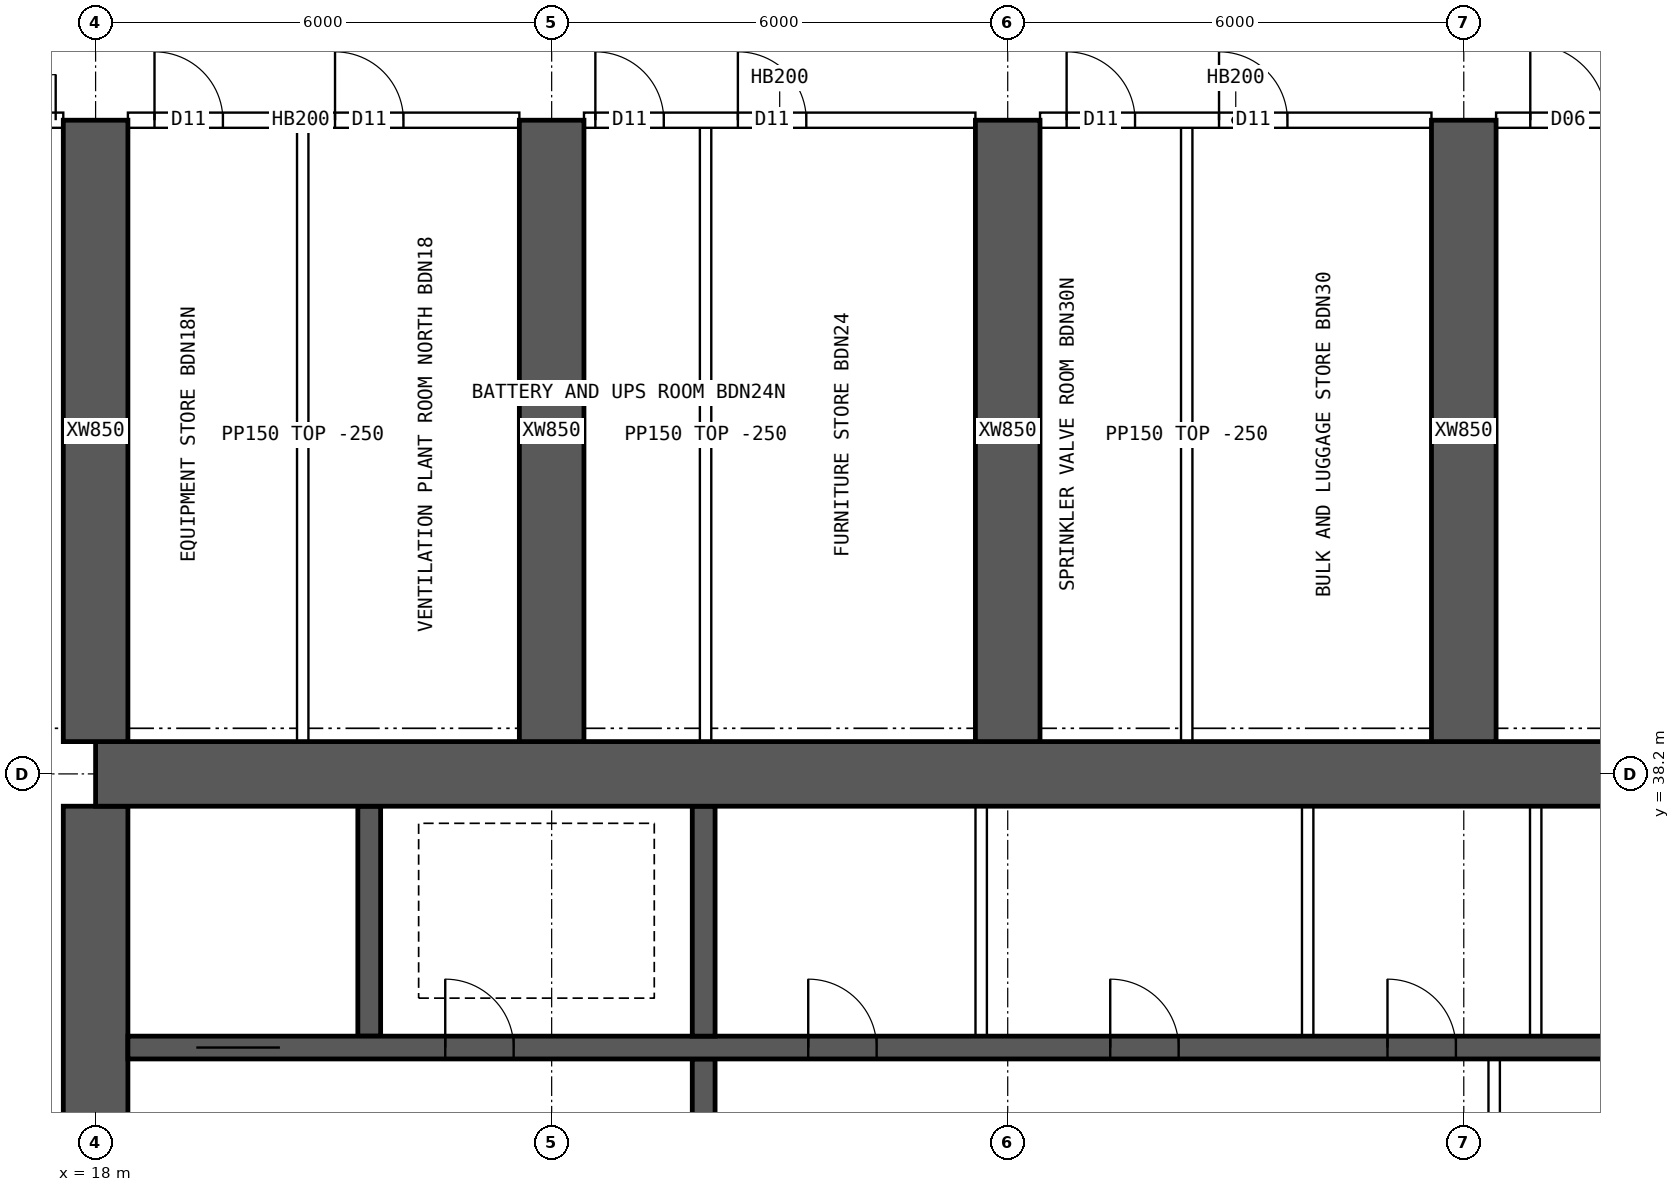
"""IFC4 building model, lengths in metres.
Left out: names, types, materials, properties, quantities, classifications, styles, units other than length and angle.
Written with IfcOpenShell. Run it as: python <this file> out.ifc"""

import sys

from ifc_helpers import new_model, si_unit, direction, frame, frame_2d, origin, place, context, subcontext, project, spatial, rectangle, extrude, element, fill, save


model = new_model("IFC4")
c1 = context("Model", 3, precision=1e-05, world=origin(), true_north=direction((0.0, 1.0)))
c2 = subcontext(c1, "Body", "Model", "MODEL_VIEW")
j1 = project(units=[si_unit("LENGTHUNIT", "METRE"), si_unit("PLANEANGLEUNIT", "RADIAN")], contexts=[c1])
p1 = place(None, origin())
s1 = spatial("IfcSite", under=j1, at=p1, CompositionType="ELEMENT")
p2 = place(p1, origin())
s2 = spatial("IfcBuilding", under=s1, at=p2, CompositionType="ELEMENT")
p3 = place(p2, frame((0.0, 0.0, 163.6)))
s3 = spatial("IfcBuildingStorey", under=s2, at=p3, CompositionType="ELEMENT", Elevation=163.6)
p4 = place(p3, frame((18.0, 38.2, 0.0), z_axis=(0.0, 0.0, 1.0), x_axis=(1.0, 0.0, 0.0)))
e1 = element("IfcWall", 1, at=p4, inside=s3, PredefinedType="SHEAR", context=c2, shape_type="SweptSolid", body=[
    extrude(rectangle(XDim=48.0, YDim=0.85, at=frame_2d((24.0, 0.0))), origin(), (0.0, 0.0, 1.0), 3.75),
])
p5 = place(p3, frame((18.0, 26.225, 0.0), z_axis=(0.0, 0.0, 1.0), x_axis=(0.0, 1.0, 0.0)))
e2 = element("IfcWall", 2, at=p5, inside=s3, PredefinedType="SHEAR", context=c2, shape_type="SweptSolid", body=[
    extrude(rectangle(XDim=11.55, YDim=0.85, at=frame_2d((5.775, 0.0))), origin(), (0.0, 0.0, 1.0), 3.75),
])
p6 = place(p5, frame((5.075, 0.0, 0.0)))
e3 = element("IfcOpeningElement", 3, at=p6, cuts=e2, PredefinedType="OPENING", context=c2, shape_type="SweptSolid", body=[
    extrude(rectangle(XDim=1.2, YDim=2.1, at=frame_2d((0.6, 1.05))), frame((0.0, 0.435, 0.0), z_axis=(0.0, -1.0, 0.0), x_axis=(1.0, 0.0, 0.0)), (0.0, 0.0, 1.0), 0.87),
])
p7 = place(p3, frame((18.425, 34.6, 0.0), z_axis=(0.0, 0.0, 1.0), x_axis=(1.0, 0.0, 0.0)))
e4 = element("IfcWall", 4, at=p7, inside=s3, PredefinedType="SHEAR", context=c2, shape_type="SweptSolid", body=[
    extrude(rectangle(XDim=47.15, YDim=0.3, at=frame_2d((23.575, 0.0))), origin(), (0.0, 0.0, 1.0), 3.75),
])
p8 = place(p7, frame((0.9, 0.0, 0.0)))
e5 = element("IfcOpeningElement", 5, at=p8, cuts=e4, PredefinedType="OPENING", context=c2, shape_type="SweptSolid", body=[
    extrude(rectangle(XDim=1.1, YDim=2.1, at=frame_2d((0.55, 1.05))), frame((0.0, 0.16, 0.0), z_axis=(0.0, -1.0, 0.0), x_axis=(1.0, 0.0, 0.0)), (0.0, 0.0, 1.0), 0.32),
])
p9 = place(p7, frame((45.15, 0.0, 0.0)))
e6 = element("IfcOpeningElement", 6, at=p9, cuts=e4, PredefinedType="OPENING", context=c2, shape_type="SweptSolid", body=[
    extrude(rectangle(XDim=1.1, YDim=2.1, at=frame_2d((0.55, 1.05))), frame((0.0, 0.16, 0.0), z_axis=(0.0, -1.0, 0.0), x_axis=(1.0, 0.0, 0.0)), (0.0, 0.0, 1.0), 0.32),
])
p10 = place(p7, frame((4.175, 0.0, 0.0)))
e7 = element("IfcOpeningElement", 7, at=p10, cuts=e4, PredefinedType="OPENING", context=c2, shape_type="SweptSolid", body=[
    extrude(rectangle(XDim=0.9, YDim=2.1, at=frame_2d((0.45, 1.05))), frame((0.0, 0.16, 0.0), z_axis=(0.0, -1.0, 0.0), x_axis=(1.0, 0.0, 0.0)), (0.0, 0.0, 1.0), 0.32),
])
p11 = place(p7, frame((42.075, 0.0, 0.0)))
e8 = element("IfcOpeningElement", 8, at=p11, cuts=e4, PredefinedType="OPENING", context=c2, shape_type="SweptSolid", body=[
    extrude(rectangle(XDim=0.9, YDim=2.1, at=frame_2d((0.45, 1.05))), frame((0.0, 0.16, 0.0), z_axis=(0.0, -1.0, 0.0), x_axis=(1.0, 0.0, 0.0)), (0.0, 0.0, 1.0), 0.32),
])
p12 = place(p7, frame((8.95, 0.0, 0.0)))
e9 = element("IfcOpeningElement", 9, at=p12, cuts=e4, PredefinedType="OPENING", context=c2, shape_type="SweptSolid", body=[
    extrude(rectangle(XDim=0.9, YDim=2.1, at=frame_2d((0.45, 1.05))), frame((0.0, 0.16, 0.0), z_axis=(0.0, -1.0, 0.0), x_axis=(1.0, 0.0, 0.0)), (0.0, 0.0, 1.0), 0.32),
])
p13 = place(p7, frame((12.924, 0.0, 0.0)))
e10 = element("IfcOpeningElement", 10, at=p13, cuts=e4, PredefinedType="OPENING", context=c2, shape_type="SweptSolid", body=[
    extrude(rectangle(XDim=0.9, YDim=2.1, at=frame_2d((0.45, 1.05))), frame((0.0, 0.16, 0.0), z_axis=(0.0, -1.0, 0.0), x_axis=(1.0, 0.0, 0.0)), (0.0, 0.0, 1.0), 0.32),
])
p14 = place(p7, frame((16.571, 0.0, 0.0)))
e11 = element("IfcOpeningElement", 11, at=p14, cuts=e4, PredefinedType="OPENING", context=c2, shape_type="SweptSolid", body=[
    extrude(rectangle(XDim=0.9, YDim=2.1, at=frame_2d((0.45, 1.05))), frame((0.0, 0.16, 0.0), z_axis=(0.0, -1.0, 0.0), x_axis=(1.0, 0.0, 0.0)), (0.0, 0.0, 1.0), 0.32),
])
p15 = place(p7, frame((20.33, 0.0, 0.0)))
e12 = element("IfcOpeningElement", 12, at=p15, cuts=e4, PredefinedType="OPENING", context=c2, shape_type="SweptSolid", body=[
    extrude(rectangle(XDim=0.9, YDim=2.1, at=frame_2d((0.45, 1.05))), frame((0.0, 0.16, 0.0), z_axis=(0.0, -1.0, 0.0), x_axis=(1.0, 0.0, 0.0)), (0.0, 0.0, 1.0), 0.32),
])
p16 = place(p7, frame((24.736, 0.0, 0.0)))
e13 = element("IfcOpeningElement", 13, at=p16, cuts=e4, PredefinedType="OPENING", context=c2, shape_type="SweptSolid", body=[
    extrude(rectangle(XDim=0.9, YDim=2.1, at=frame_2d((0.45, 1.05))), frame((0.0, 0.16, 0.0), z_axis=(0.0, -1.0, 0.0), x_axis=(1.0, 0.0, 0.0)), (0.0, 0.0, 1.0), 0.32),
])
p17 = place(p7, frame((27.533, 0.0, 0.0)))
e14 = element("IfcOpeningElement", 14, at=p17, cuts=e4, PredefinedType="OPENING", context=c2, shape_type="SweptSolid", body=[
    extrude(rectangle(XDim=0.9, YDim=2.1, at=frame_2d((0.45, 1.05))), frame((0.0, 0.16, 0.0), z_axis=(0.0, -1.0, 0.0), x_axis=(1.0, 0.0, 0.0)), (0.0, 0.0, 1.0), 0.32),
])
p18 = place(p7, frame((29.906, 0.0, 0.0)))
e15 = element("IfcOpeningElement", 15, at=p18, cuts=e4, PredefinedType="OPENING", context=c2, shape_type="SweptSolid", body=[
    extrude(rectangle(XDim=0.9, YDim=2.1, at=frame_2d((0.45, 1.05))), frame((0.0, 0.16, 0.0), z_axis=(0.0, -1.0, 0.0), x_axis=(1.0, 0.0, 0.0)), (0.0, 0.0, 1.0), 0.32),
])
p19 = place(p7, frame((33.756, 0.0, 0.0)))
e16 = element("IfcOpeningElement", 16, at=p19, cuts=e4, PredefinedType="OPENING", context=c2, shape_type="SweptSolid", body=[
    extrude(rectangle(XDim=0.9, YDim=2.1, at=frame_2d((0.45, 1.05))), frame((0.0, 0.16, 0.0), z_axis=(0.0, -1.0, 0.0), x_axis=(1.0, 0.0, 0.0)), (0.0, 0.0, 1.0), 0.32),
])
p20 = place(p7, frame((37.504, 0.0, 0.0)))
e17 = element("IfcOpeningElement", 17, at=p20, cuts=e4, PredefinedType="OPENING", context=c2, shape_type="SweptSolid", body=[
    extrude(rectangle(XDim=0.9, YDim=2.1, at=frame_2d((0.45, 1.05))), frame((0.0, 0.16, 0.0), z_axis=(0.0, -1.0, 0.0), x_axis=(1.0, 0.0, 0.0)), (0.0, 0.0, 1.0), 0.32),
])
p21 = place(p3, frame((26.0, 30.55, 0.0), z_axis=(0.0, 0.0, 1.0), x_axis=(0.0, 1.0, 0.0)))
e18 = element("IfcWall", 18, at=p21, inside=s3, PredefinedType="SHEAR", context=c2, shape_type="SweptSolid", body=[
    extrude(rectangle(XDim=3.9, YDim=0.3, at=frame_2d((1.95, 0.0))), origin(), (0.0, 0.0, 1.0), 3.75),
])
p22 = place(p21, frame((1.4, 0.0, 0.0)))
e19 = element("IfcOpeningElement", 19, at=p22, cuts=e18, PredefinedType="OPENING", context=c2, shape_type="SweptSolid", body=[
    extrude(rectangle(XDim=1.2, YDim=2.1, at=frame_2d((0.6, 1.05))), frame((0.0, 0.16, 0.0), z_axis=(0.0, -1.0, 0.0), x_axis=(1.0, 0.0, 0.0)), (0.0, 0.0, 1.0), 0.32),
])
for number, where, z_axis, x_axis in (
    (20, (21.6, 34.75, 0.0), (0.0, 0.0, 1.0), (0.0, 1.0, 0.0)),
    (21, (26.0, 34.75, 0.0), (0.0, 0.0, 1.0), (0.0, 1.0, 0.0)),
):
    element("IfcWall", number, at=place(p3, frame(where, z_axis=z_axis, x_axis=x_axis)), inside=s3, PredefinedType="SHEAR", context=c2, shape_type="SweptSolid", body=[
        extrude(rectangle(XDim=3.025, YDim=0.3, at=frame_2d((1.512, 0.0))), origin(), (0.0, 0.0, 1.0), 3.75),
    ])
for number, where, z_axis, x_axis in (
    (22, (18.0, 38.625, 0.0), (0.0, 0.0, 1.0), (0.0, 1.0, 0.0)),
    (23, (24.0, 38.625, 0.0), (0.0, 0.0, 1.0), (0.0, 1.0, 0.0)),
    (24, (30.0, 38.625, 0.0), (0.0, 0.0, 1.0), (0.0, 1.0, 0.0)),
    (25, (36.0, 38.625, 0.0), (0.0, 0.0, 1.0), (0.0, 1.0, 0.0)),
):
    element("IfcWall", number, at=place(p3, frame(where, z_axis=z_axis, x_axis=x_axis)), inside=s3, PredefinedType="SHEAR", context=c2, shape_type="SweptSolid", body=[
        extrude(rectangle(XDim=8.175, YDim=0.85, at=frame_2d((4.087, 0.0))), origin(), (0.0, 0.0, 1.0), 3.75),
    ])
p23 = place(p3, frame((36.4, 30.55, 0.0), z_axis=(0.0, 0.0, 1.0), x_axis=(0.0, 1.0, 0.0)))
e26 = element("IfcWall", 26, at=p23, inside=s3, PredefinedType="SOLIDWALL", context=c2, shape_type="SweptSolid", body=[
    extrude(rectangle(XDim=3.9, YDim=0.15, at=frame_2d((1.95, 0.0))), origin(), (0.0, 0.0, 1.0), 3.5),
])
p24 = place(p23, frame((1.15, 0.0, 0.0)))
e27 = element("IfcOpeningElement", 27, at=p24, cuts=e26, PredefinedType="OPENING", context=c2, shape_type="SweptSolid", body=[
    extrude(rectangle(XDim=1.6, YDim=2.1, at=frame_2d((0.8, 1.05))), frame((0.0, 0.085, 0.0), z_axis=(0.0, -1.0, 0.0), x_axis=(1.0, 0.0, 0.0)), (0.0, 0.0, 1.0), 0.17),
])
for number, where, z_axis, x_axis in (
    (28, (29.651, 34.75, 0.0), (0.0, 0.0, 1.0), (0.0, 1.0, 0.0)),
    (29, (33.946, 34.75, 0.0), (0.0, 0.0, 1.0), (0.0, 1.0, 0.0)),
    (30, (36.946, 34.75, 0.0), (0.0, 0.0, 1.0), (0.0, 1.0, 0.0)),
):
    element("IfcWall", number, at=place(p3, frame(where, z_axis=z_axis, x_axis=x_axis)), inside=s3, PredefinedType="SOLIDWALL", context=c2, shape_type="SweptSolid", body=[
        extrude(rectangle(XDim=3.025, YDim=0.15, at=frame_2d((1.512, 0.0))), origin(), (0.0, 0.0, 1.0), 3.5),
    ])
p25 = place(p3, frame((15.6, 46.8, 0.0), z_axis=(0.0, 0.0, 1.0), x_axis=(1.0, 0.0, 0.0)))
e31 = element("IfcWall", 31, at=p25, inside=s3, PredefinedType="SOLIDWALL", context=c2, shape_type="SweptSolid", body=[
    extrude(rectangle(XDim=1.975, YDim=0.2, at=frame_2d((0.987, 0.0))), origin(), (0.0, 0.0, 1.0), 3.5),
])
p26 = place(p25, frame((0.675, 0.0, 0.0)))
e32 = element("IfcOpeningElement", 32, at=p26, cuts=e31, PredefinedType="OPENING", context=c2, shape_type="SweptSolid", body=[
    extrude(rectangle(XDim=1.2, YDim=2.1, at=frame_2d((0.6, 1.05))), frame((0.0, 0.11, 0.0), z_axis=(0.0, -1.0, 0.0), x_axis=(1.0, 0.0, 0.0)), (0.0, 0.0, 1.0), 0.22),
])
p27 = place(p3, frame((18.425, 46.8, 0.0), z_axis=(0.0, 0.0, 1.0), x_axis=(1.0, 0.0, 0.0)))
e33 = element("IfcWall", 33, at=p27, inside=s3, PredefinedType="SOLIDWALL", context=c2, shape_type="SweptSolid", body=[
    extrude(rectangle(XDim=5.15, YDim=0.2, at=frame_2d((2.575, 0.0))), origin(), (0.0, 0.0, 1.0), 3.5),
])
p28 = place(p27, frame((0.35, 0.0, 0.0)))
e34 = element("IfcOpeningElement", 34, at=p28, cuts=e33, PredefinedType="OPENING", context=c2, shape_type="SweptSolid", body=[
    extrude(rectangle(XDim=0.9, YDim=2.1, at=frame_2d((0.45, 1.05))), frame((0.0, 0.11, 0.0), z_axis=(0.0, -1.0, 0.0), x_axis=(1.0, 0.0, 0.0)), (0.0, 0.0, 1.0), 0.22),
])
p29 = place(p27, frame((2.725, 0.0, 0.0)))
e35 = element("IfcOpeningElement", 35, at=p29, cuts=e33, PredefinedType="OPENING", context=c2, shape_type="SweptSolid", body=[
    extrude(rectangle(XDim=0.9, YDim=2.1, at=frame_2d((0.45, 1.05))), frame((0.0, 0.11, 0.0), z_axis=(0.0, -1.0, 0.0), x_axis=(1.0, 0.0, 0.0)), (0.0, 0.0, 1.0), 0.22),
])
p30 = place(p3, frame((24.425, 46.8, 0.0), z_axis=(0.0, 0.0, 1.0), x_axis=(1.0, 0.0, 0.0)))
e36 = element("IfcWall", 36, at=p30, inside=s3, PredefinedType="SOLIDWALL", context=c2, shape_type="SweptSolid", body=[
    extrude(rectangle(XDim=5.15, YDim=0.2, at=frame_2d((2.575, 0.0))), origin(), (0.0, 0.0, 1.0), 3.5),
])
p31 = place(p30, frame((0.15, 0.0, 0.0)))
e37 = element("IfcOpeningElement", 37, at=p31, cuts=e36, PredefinedType="OPENING", context=c2, shape_type="SweptSolid", body=[
    extrude(rectangle(XDim=0.9, YDim=2.1, at=frame_2d((0.45, 1.05))), frame((0.0, 0.11, 0.0), z_axis=(0.0, -1.0, 0.0), x_axis=(1.0, 0.0, 0.0)), (0.0, 0.0, 1.0), 0.22),
])
p32 = place(p30, frame((2.025, 0.0, 0.0)))
e38 = element("IfcOpeningElement", 38, at=p32, cuts=e36, PredefinedType="OPENING", context=c2, shape_type="SweptSolid", body=[
    extrude(rectangle(XDim=0.9, YDim=2.1, at=frame_2d((0.45, 1.05))), frame((0.0, 0.11, 0.0), z_axis=(0.0, -1.0, 0.0), x_axis=(1.0, 0.0, 0.0)), (0.0, 0.0, 1.0), 0.22),
])
p33 = place(p3, frame((30.425, 46.8, 0.0), z_axis=(0.0, 0.0, 1.0), x_axis=(1.0, 0.0, 0.0)))
e39 = element("IfcWall", 39, at=p33, inside=s3, PredefinedType="SOLIDWALL", context=c2, shape_type="SweptSolid", body=[
    extrude(rectangle(XDim=5.15, YDim=0.2, at=frame_2d((2.575, 0.0))), origin(), (0.0, 0.0, 1.0), 3.5),
])
p34 = place(p33, frame((0.35, 0.0, 0.0)))
e40 = element("IfcOpeningElement", 40, at=p34, cuts=e39, PredefinedType="OPENING", context=c2, shape_type="SweptSolid", body=[
    extrude(rectangle(XDim=0.9, YDim=2.1, at=frame_2d((0.45, 1.05))), frame((0.0, 0.11, 0.0), z_axis=(0.0, -1.0, 0.0), x_axis=(1.0, 0.0, 0.0)), (0.0, 0.0, 1.0), 0.22),
])
p35 = place(p33, frame((2.355, 0.0, 0.0)))
e41 = element("IfcOpeningElement", 41, at=p35, cuts=e39, PredefinedType="OPENING", context=c2, shape_type="SweptSolid", body=[
    extrude(rectangle(XDim=0.9, YDim=2.1, at=frame_2d((0.45, 1.05))), frame((0.0, 0.11, 0.0), z_axis=(0.0, -1.0, 0.0), x_axis=(1.0, 0.0, 0.0)), (0.0, 0.0, 1.0), 0.22),
])
p36 = place(p3, frame((36.425, 46.8, 0.0), z_axis=(0.0, 0.0, 1.0), x_axis=(1.0, 0.0, 0.0)))
e42 = element("IfcWall", 42, at=p36, inside=s3, PredefinedType="SOLIDWALL", context=c2, shape_type="SweptSolid", body=[
    extrude(rectangle(XDim=5.15, YDim=0.2, at=frame_2d((2.575, 0.0))), origin(), (0.0, 0.0, 1.0), 3.5),
])
p37 = place(p36, frame((0.45, 0.0, 0.0)))
e43 = element("IfcOpeningElement", 43, at=p37, cuts=e42, PredefinedType="OPENING", context=c2, shape_type="SweptSolid", body=[
    extrude(rectangle(XDim=1.0, YDim=2.1, at=frame_2d((0.5, 1.05))), frame((0.0, 0.11, 0.0), z_axis=(0.0, -1.0, 0.0), x_axis=(1.0, 0.0, 0.0)), (0.0, 0.0, 1.0), 0.22),
])
for number, where, z_axis, x_axis in (
    (44, (20.725, 38.625, 0.0), (0.0, 0.0, 1.0), (0.0, 1.0, 0.0)),
    (45, (26.025, 38.625, 0.0), (0.0, 0.0, 1.0), (0.0, 1.0, 0.0)),
    (46, (32.355, 38.625, 0.0), (0.0, 0.0, 1.0), (0.0, 1.0, 0.0)),
):
    element("IfcWall", number, at=place(p3, frame(where, z_axis=z_axis, x_axis=x_axis)), inside=s3, PredefinedType="PARTITIONING", context=c2, shape_type="SweptSolid", body=[
        extrude(rectangle(XDim=8.075, YDim=0.15, at=frame_2d((4.038, 0.0))), origin(), (0.0, 0.0, 1.0), 3.5),
    ])
p38 = place(p8, origin())
e47 = element("IfcDoor", 47, at=p38, inside=s3, OperationType="DOUBLE_DOOR_SLIDING", PredefinedType="DOOR", context=c2, shape_type="SweptSolid", body=[
    extrude(rectangle(XDim=1.1, YDim=2.1, at=frame_2d((0.55, 1.05))), frame((0.0, 0.025, 0.0), z_axis=(0.0, -1.0, 0.0), x_axis=(1.0, 0.0, 0.0)), (0.0, 0.0, 1.0), 0.05),
])
fill(e5, e47)
p39 = place(p10, origin())
e48 = element("IfcDoor", 48, at=p39, inside=s3, OperationType="SINGLE_SWING_LEFT", PredefinedType="DOOR", context=c2, shape_type="SweptSolid", body=[
    extrude(rectangle(XDim=0.9, YDim=2.1, at=frame_2d((0.45, 1.05))), frame((0.0, 0.025, 0.0), z_axis=(0.0, -1.0, 0.0), x_axis=(1.0, 0.0, 0.0)), (0.0, 0.0, 1.0), 0.05),
])
fill(e7, e48)
p40 = place(p12, origin())
e49 = element("IfcDoor", 49, at=p40, inside=s3, OperationType="SINGLE_SWING_LEFT", PredefinedType="DOOR", context=c2, shape_type="SweptSolid", body=[
    extrude(rectangle(XDim=0.9, YDim=2.1, at=frame_2d((0.45, 1.05))), frame((0.0, 0.025, 0.0), z_axis=(0.0, -1.0, 0.0), x_axis=(1.0, 0.0, 0.0)), (0.0, 0.0, 1.0), 0.05),
])
fill(e9, e49)
p41 = place(p13, origin())
e50 = element("IfcDoor", 50, at=p41, inside=s3, OperationType="SINGLE_SWING_LEFT", PredefinedType="DOOR", context=c2, shape_type="SweptSolid", body=[
    extrude(rectangle(XDim=0.9, YDim=2.1, at=frame_2d((0.45, 1.05))), frame((0.0, 0.025, 0.0), z_axis=(0.0, -1.0, 0.0), x_axis=(1.0, 0.0, 0.0)), (0.0, 0.0, 1.0), 0.05),
])
fill(e10, e50)
p42 = place(p14, origin())
e51 = element("IfcDoor", 51, at=p42, inside=s3, OperationType="SINGLE_SWING_LEFT", PredefinedType="DOOR", context=c2, shape_type="SweptSolid", body=[
    extrude(rectangle(XDim=0.9, YDim=2.1, at=frame_2d((0.45, 1.05))), frame((0.0, 0.025, 0.0), z_axis=(0.0, -1.0, 0.0), x_axis=(1.0, 0.0, 0.0)), (0.0, 0.0, 1.0), 0.05),
])
fill(e11, e51)
p43 = place(p26, origin())
e52 = element("IfcDoor", 52, at=p43, inside=s3, OperationType="DOUBLE_DOOR_SINGLE_SWING", PredefinedType="DOOR", context=c2, shape_type="SweptSolid", body=[
    extrude(rectangle(XDim=1.2, YDim=2.1, at=frame_2d((0.6, 1.05))), frame((0.0, 0.025, 0.0), z_axis=(0.0, -1.0, 0.0), x_axis=(1.0, 0.0, 0.0)), (0.0, 0.0, 1.0), 0.05),
])
fill(e32, e52)
p44 = place(p28, origin())
e53 = element("IfcDoor", 53, at=p44, inside=s3, OperationType="SINGLE_SWING_LEFT", PredefinedType="DOOR", context=c2, shape_type="SweptSolid", body=[
    extrude(rectangle(XDim=0.9, YDim=2.1, at=frame_2d((0.45, 1.05))), frame((0.0, 0.025, 0.0), z_axis=(0.0, -1.0, 0.0), x_axis=(1.0, 0.0, 0.0)), (0.0, 0.0, 1.0), 0.05),
])
fill(e34, e53)
p45 = place(p29, origin())
e54 = element("IfcDoor", 54, at=p45, inside=s3, OperationType="SINGLE_SWING_LEFT", PredefinedType="DOOR", context=c2, shape_type="SweptSolid", body=[
    extrude(rectangle(XDim=0.9, YDim=2.1, at=frame_2d((0.45, 1.05))), frame((0.0, 0.025, 0.0), z_axis=(0.0, -1.0, 0.0), x_axis=(1.0, 0.0, 0.0)), (0.0, 0.0, 1.0), 0.05),
])
fill(e35, e54)
p46 = place(p31, origin())
e55 = element("IfcDoor", 55, at=p46, inside=s3, OperationType="SINGLE_SWING_LEFT", PredefinedType="DOOR", context=c2, shape_type="SweptSolid", body=[
    extrude(rectangle(XDim=0.9, YDim=2.1, at=frame_2d((0.45, 1.05))), frame((0.0, 0.025, 0.0), z_axis=(0.0, -1.0, 0.0), x_axis=(1.0, 0.0, 0.0)), (0.0, 0.0, 1.0), 0.05),
])
fill(e37, e55)
p47 = place(p32, origin())
e56 = element("IfcDoor", 56, at=p47, inside=s3, OperationType="SINGLE_SWING_LEFT", PredefinedType="DOOR", context=c2, shape_type="SweptSolid", body=[
    extrude(rectangle(XDim=0.9, YDim=2.1, at=frame_2d((0.45, 1.05))), frame((0.0, 0.025, 0.0), z_axis=(0.0, -1.0, 0.0), x_axis=(1.0, 0.0, 0.0)), (0.0, 0.0, 1.0), 0.05),
])
fill(e38, e56)
p48 = place(p34, origin())
e57 = element("IfcDoor", 57, at=p48, inside=s3, OperationType="SINGLE_SWING_LEFT", PredefinedType="DOOR", context=c2, shape_type="SweptSolid", body=[
    extrude(rectangle(XDim=0.9, YDim=2.1, at=frame_2d((0.45, 1.05))), frame((0.0, 0.025, 0.0), z_axis=(0.0, -1.0, 0.0), x_axis=(1.0, 0.0, 0.0)), (0.0, 0.0, 1.0), 0.05),
])
fill(e40, e57)
p49 = place(p35, origin())
e58 = element("IfcDoor", 58, at=p49, inside=s3, OperationType="SINGLE_SWING_LEFT", PredefinedType="DOOR", context=c2, shape_type="SweptSolid", body=[
    extrude(rectangle(XDim=0.9, YDim=2.1, at=frame_2d((0.45, 1.05))), frame((0.0, 0.025, 0.0), z_axis=(0.0, -1.0, 0.0), x_axis=(1.0, 0.0, 0.0)), (0.0, 0.0, 1.0), 0.05),
])
fill(e41, e58)
p50 = place(p37, origin())
e59 = element("IfcDoor", 59, at=p50, inside=s3, OperationType="SINGLE_SWING_LEFT", PredefinedType="DOOR", context=c2, shape_type="SweptSolid", body=[
    extrude(rectangle(XDim=1.0, YDim=2.1, at=frame_2d((0.5, 1.05))), frame((0.0, 0.025, 0.0), z_axis=(0.0, -1.0, 0.0), x_axis=(1.0, 0.0, 0.0)), (0.0, 0.0, 1.0), 0.05),
])
fill(e43, e59)
save(model, sys.argv[1])
